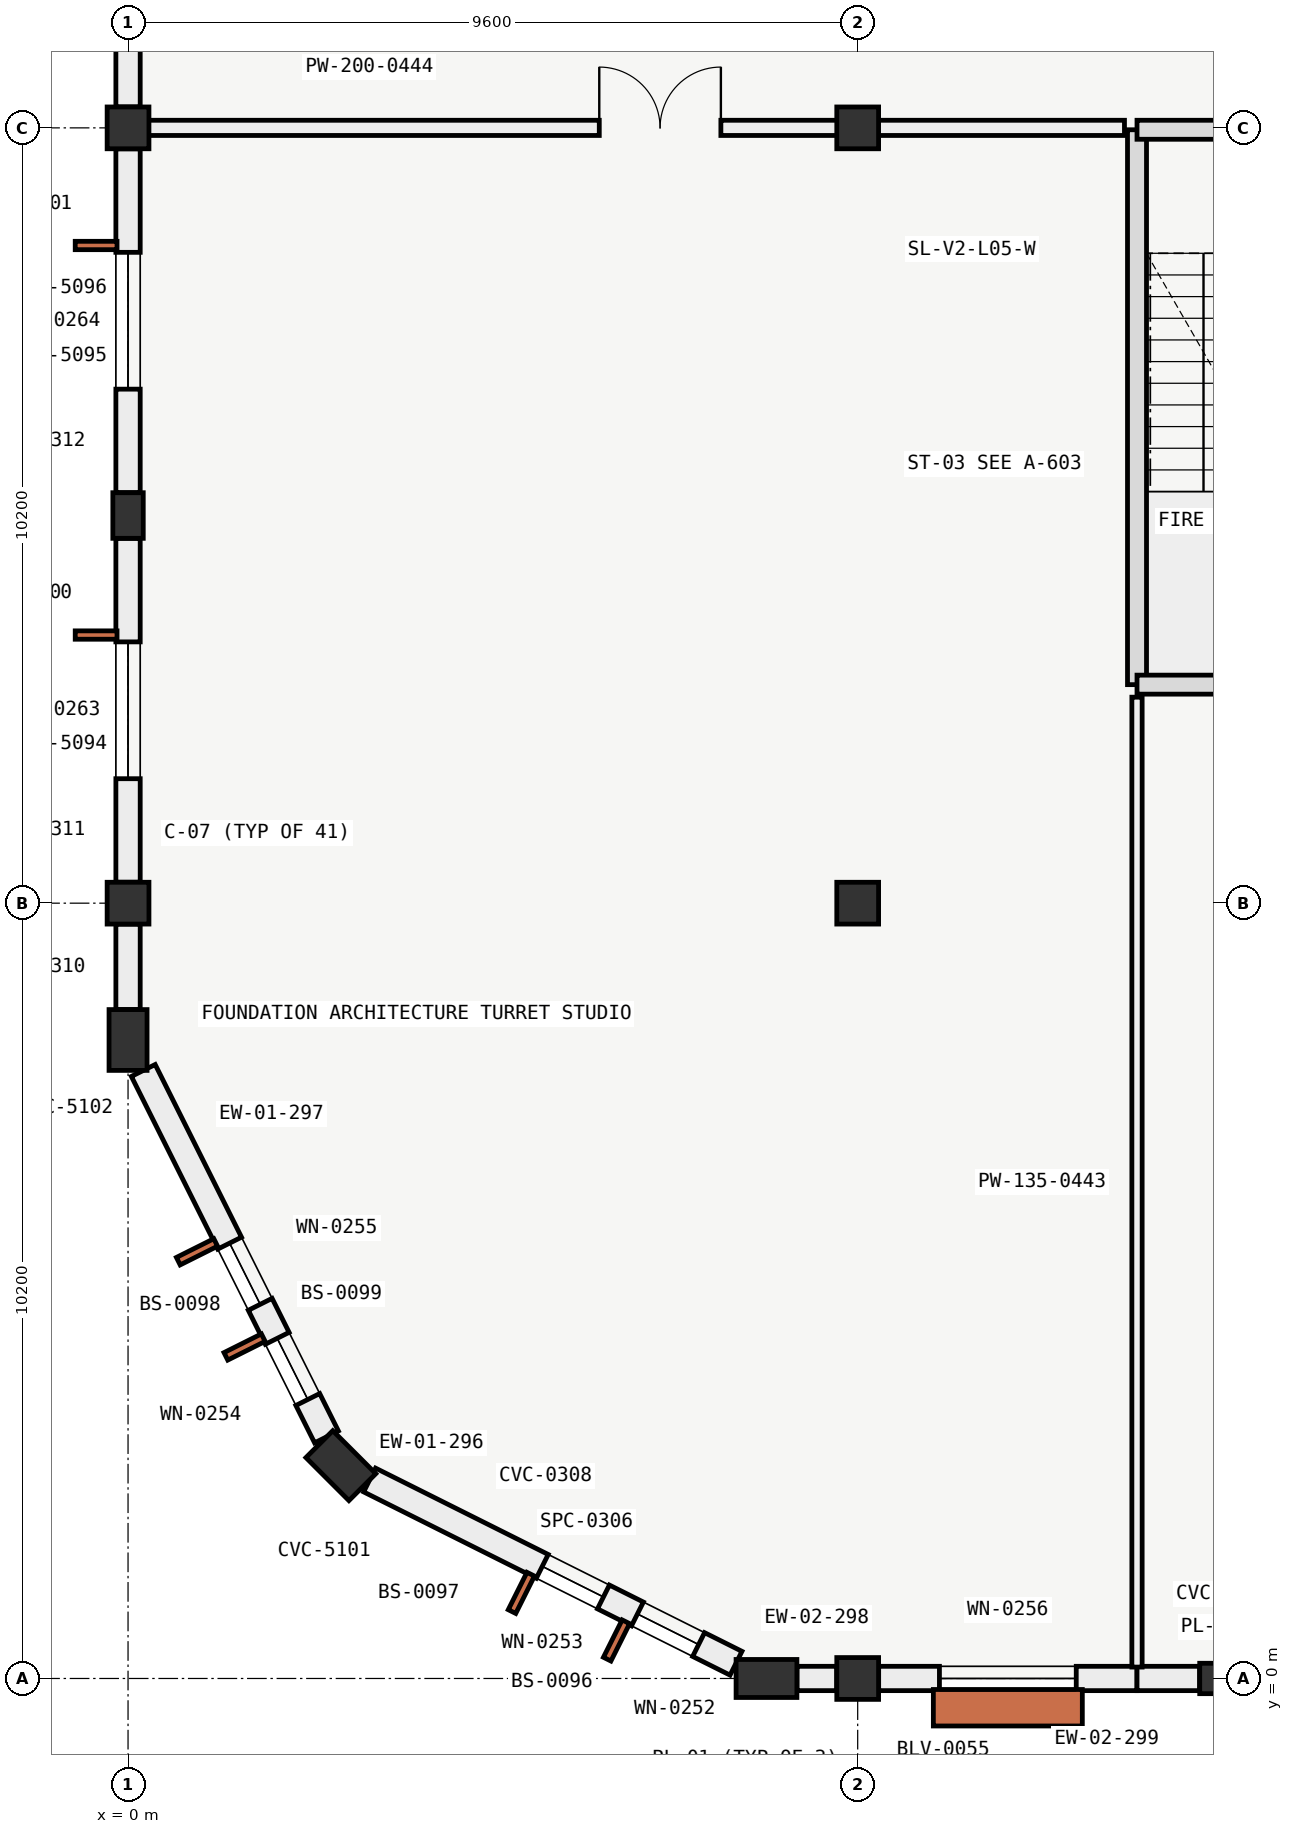
"""IFC4 building model, lengths in metres.
Left out: names, types, materials, properties, quantities, classifications, styles, units other than length and angle.
Written with IfcOpenShell. Run it as: python <this file> out.ifc"""

import sys

from ifc_helpers import new_model, si_unit, direction, frame, frame_2d, origin, origin_2d, place, context, subcontext, project, spatial, rectangle, extrude, element, fill, save


model = new_model("IFC4")
c1 = context("Model", 3, precision=1e-05, world=origin(), true_north=direction((0.0, 1.0)))
c2 = subcontext(c1, "Body", "Model", "MODEL_VIEW")
j1 = project(units=[si_unit("LENGTHUNIT", "METRE"), si_unit("PLANEANGLEUNIT", "RADIAN")], contexts=[c1])
p1 = place(None, origin())
s1 = spatial("IfcSite", under=j1, at=p1, CompositionType="ELEMENT")
p2 = place(p1, origin())
s2 = spatial("IfcBuilding", under=s1, at=p2, CompositionType="ELEMENT")
p3 = place(p2, frame((0.0, 0.0, 22.2)))
s3 = spatial("IfcBuildingStorey", under=s2, at=p3, CompositionType="ELEMENT", Elevation=22.2)
for number, where, z_axis, x_axis in (
    (1, (0.0, 10.2, 0.0), (0.0, 0.0, 1.0), (1.0, 0.0, 0.0)),
    (2, (0.0, 20.4, 0.0), (0.0, 0.0, 1.0), (1.0, 0.0, 0.0)),
    (3, (9.6, 0.0, 0.0), (0.0, 0.0, 1.0), (1.0, 0.0, 0.0)),
    (4, (9.6, 10.2, 0.0), (0.0, 0.0, 1.0), (1.0, 0.0, 0.0)),
    (5, (9.6, 20.4, 0.0), (0.0, 0.0, 1.0), (1.0, 0.0, 0.0)),
):
    element("IfcColumn", number, at=place(p3, frame(where, z_axis=z_axis, x_axis=x_axis)), inside=s3, PredefinedType="COLUMN", context=c2, shape_type="SweptSolid", body=[
        extrude(rectangle(XDim=0.55, YDim=0.55, at=origin_2d()), origin(), (0.0, 0.0, 1.0), 4.2),
    ])
for number, where, z_axis, x_axis in (
    (6, (8.4, 0.0, 0.0), (0.0, 0.0, 1.0), (0.0, 1.0, 0.0)),
    (7, (2.8, 2.8, 0.0), (0.0, 0.0, 1.0), (0.707, 0.707, 0.0)),
    (8, (0.0, 8.4, 0.0), (0.0, 0.0, 1.0), (1.0, 0.0, 0.0)),
):
    element("IfcColumn", number, at=place(p3, frame(where, z_axis=z_axis, x_axis=x_axis)), inside=s3, PredefinedType="PILASTER", context=c2, shape_type="SweptSolid", body=[
        extrude(rectangle(XDim=0.5, YDim=0.8, at=origin_2d()), origin(), (0.0, 0.0, 1.0), 4.2),
    ])
for number, where, z_axis, x_axis in (
    (9, (14.4, 0.0, 0.0), (0.0, 0.0, 1.0), (0.0, 1.0, 0.0)),
    (10, (0.0, 15.3, 0.0), (0.0, 0.0, 1.0), (1.0, 0.0, 0.0)),
):
    element("IfcColumn", number, at=place(p3, frame(where, z_axis=z_axis, x_axis=x_axis)), inside=s3, PredefinedType="PILASTER", context=c2, shape_type="SweptSolid", body=[
        extrude(rectangle(XDim=0.4, YDim=0.6, at=origin_2d()), origin(), (0.0, 0.0, 1.0), 4.2),
    ])
p4 = place(p3, frame((7.999, 0.2, 0.0), z_axis=(0.0, 0.0, 1.0), x_axis=(-0.894418132042, 0.447231712958, 0.0)))
e11 = element("IfcWall", 11, at=p4, inside=s3, PredefinedType="SOLIDWALL", context=c2, shape_type="SweptSolid", body=[
    extrude(rectangle(XDim=5.39, YDim=0.35, at=frame_2d((2.695, 0.0))), origin(), (0.0, 0.0, 1.0), 3.255),
])
p5 = place(p4, frame((0.55, 0.0, 0.7)))
e12 = element("IfcOpeningElement", 12, at=p5, cuts=e11, PredefinedType="OPENING", context=c2, shape_type="SweptSolid", body=[
    extrude(rectangle(XDim=0.9, YDim=2.2, at=frame_2d((0.45, 1.1))), frame((0.0, 0.185, 0.0), z_axis=(0.0, -1.0, 0.0), x_axis=(1.0, 0.0, 0.0)), (0.0, 0.0, 1.0), 0.37),
])
p6 = place(p4, frame((1.95, 0.0, 0.7)))
e13 = element("IfcOpeningElement", 13, at=p6, cuts=e11, PredefinedType="OPENING", context=c2, shape_type="SweptSolid", body=[
    extrude(rectangle(XDim=0.9, YDim=2.2, at=frame_2d((0.45, 1.1))), frame((0.0, 0.185, 0.0), z_axis=(0.0, -1.0, 0.0), x_axis=(1.0, 0.0, 0.0)), (0.0, 0.0, 1.0), 0.37),
])
p7 = place(p3, frame((2.611, 3.178, 0.0), z_axis=(0.0, 0.0, 1.0), x_axis=(-0.447231712958, 0.894418132042, 0.0)))
e14 = element("IfcWall", 14, at=p7, inside=s3, PredefinedType="SOLIDWALL", context=c2, shape_type="SweptSolid", body=[
    extrude(rectangle(XDim=5.39, YDim=0.35, at=frame_2d((2.695, 0.0))), origin(), (0.0, 0.0, 1.0), 3.255),
])
p8 = place(p7, frame((0.55, 0.0, 0.7)))
e15 = element("IfcOpeningElement", 15, at=p8, cuts=e14, PredefinedType="OPENING", context=c2, shape_type="SweptSolid", body=[
    extrude(rectangle(XDim=0.9, YDim=2.2, at=frame_2d((0.45, 1.1))), frame((0.0, 0.185, 0.0), z_axis=(0.0, -1.0, 0.0), x_axis=(1.0, 0.0, 0.0)), (0.0, 0.0, 1.0), 0.37),
])
p9 = place(p7, frame((1.95, 0.0, 0.7)))
e16 = element("IfcOpeningElement", 16, at=p9, cuts=e14, PredefinedType="OPENING", context=c2, shape_type="SweptSolid", body=[
    extrude(rectangle(XDim=0.9, YDim=2.2, at=frame_2d((0.45, 1.1))), frame((0.0, 0.185, 0.0), z_axis=(0.0, -1.0, 0.0), x_axis=(1.0, 0.0, 0.0)), (0.0, 0.0, 1.0), 0.37),
])
p10 = place(p3, frame((9.324, 0.0, 0.0), z_axis=(0.0, 0.0, 1.0), x_axis=(-1.0, 0.0, 0.0)))
e17 = element("IfcWall", 17, at=p10, inside=s3, PredefinedType="SOLIDWALL", context=c2, shape_type="SweptSolid", body=[
    extrude(rectangle(XDim=0.523, YDim=0.32, at=frame_2d((0.261, 0.0))), origin(), (0.0, 0.0, 1.0), 3.3),
])
p11 = place(p3, frame((13.275, 0.0, 0.0), z_axis=(0.0, 0.0, 1.0), x_axis=(-1.0, 0.0, 0.0)))
e18 = element("IfcWall", 18, at=p11, inside=s3, PredefinedType="SOLIDWALL", context=c2, shape_type="SweptSolid", body=[
    extrude(rectangle(XDim=3.399, YDim=0.32, at=frame_2d((1.699, 0.0))), origin(), (0.0, 0.0, 1.0), 3.3),
])
p12 = place(p11, frame((0.8, 0.0, 0.8)))
e19 = element("IfcOpeningElement", 19, at=p12, cuts=e18, PredefinedType="OPENING", context=c2, shape_type="SweptSolid", body=[
    extrude(rectangle(XDim=1.8, YDim=2.1, at=frame_2d((0.9, 1.05))), frame((0.0, 0.17, 0.0), z_axis=(0.0, -1.0, 0.0), x_axis=(1.0, 0.0, 0.0)), (0.0, 0.0, 1.0), 0.34),
])
p13 = place(p3, frame((14.099, 0.0, 0.0), z_axis=(0.0, 0.0, 1.0), x_axis=(-1.0, 0.0, 0.0)))
e20 = element("IfcWall", 20, at=p13, inside=s3, PredefinedType="SOLIDWALL", context=c2, shape_type="SweptSolid", body=[
    extrude(rectangle(XDim=0.824, YDim=0.32, at=frame_2d((0.412, 0.0))), origin(), (0.0, 0.0, 1.0), 3.3),
])
p14 = place(p3, frame((0.0, 8.801, 0.0), z_axis=(0.0, 0.0, 1.0), x_axis=(0.0, 1.0, 0.0)))
e21 = element("IfcWall", 21, at=p14, inside=s3, PredefinedType="SOLIDWALL", context=c2, shape_type="SweptSolid", body=[
    extrude(rectangle(XDim=1.123, YDim=0.32, at=frame_2d((0.562, 0.0))), origin(), (0.0, 0.0, 1.0), 3.3),
])
p15 = place(p3, frame((0.0, 10.476, 0.0), z_axis=(0.0, 0.0, 1.0), x_axis=(0.0, 1.0, 0.0)))
e22 = element("IfcWall", 22, at=p15, inside=s3, PredefinedType="SOLIDWALL", context=c2, shape_type="SweptSolid", body=[
    extrude(rectangle(XDim=4.523, YDim=0.32, at=frame_2d((2.261, 0.0))), origin(), (0.0, 0.0, 1.0), 3.3),
])
p16 = place(p15, frame((1.362, 0.0, 0.85)))
e23 = element("IfcOpeningElement", 23, at=p16, cuts=e22, PredefinedType="OPENING", context=c2, shape_type="SweptSolid", body=[
    extrude(rectangle(XDim=1.8, YDim=2.1, at=frame_2d((0.9, 1.05))), frame((0.0, 0.17, 0.0), z_axis=(0.0, -1.0, 0.0), x_axis=(1.0, 0.0, 0.0)), (0.0, 0.0, 1.0), 0.34),
])
p17 = place(p3, frame((0.0, 15.601, 0.0), z_axis=(0.0, 0.0, 1.0), x_axis=(0.0, 1.0, 0.0)))
e24 = element("IfcWall", 24, at=p17, inside=s3, PredefinedType="SOLIDWALL", context=c2, shape_type="SweptSolid", body=[
    extrude(rectangle(XDim=4.523, YDim=0.32, at=frame_2d((2.261, 0.0))), origin(), (0.0, 0.0, 1.0), 3.3),
])
p18 = place(p17, frame((1.362, 0.0, 0.85)))
e25 = element("IfcOpeningElement", 25, at=p18, cuts=e24, PredefinedType="OPENING", context=c2, shape_type="SweptSolid", body=[
    extrude(rectangle(XDim=1.8, YDim=2.1, at=frame_2d((0.9, 1.05))), frame((0.0, 0.17, 0.0), z_axis=(0.0, -1.0, 0.0), x_axis=(1.0, 0.0, 0.0)), (0.0, 0.0, 1.0), 0.34),
])
p19 = place(p3, frame((0.0, 20.676, 0.0), z_axis=(0.0, 0.0, 1.0), x_axis=(0.0, 1.0, 0.0)))
e26 = element("IfcWall", 26, at=p19, inside=s3, PredefinedType="SOLIDWALL", context=c2, shape_type="SweptSolid", body=[
    extrude(rectangle(XDim=3.274, YDim=0.32, at=frame_2d((1.637, 0.0))), origin(), (0.0, 0.0, 1.0), 3.3),
])
p20 = place(p19, frame((1.037, 0.0, 0.75)))
e27 = element("IfcOpeningElement", 27, at=p20, cuts=e26, PredefinedType="OPENING", context=c2, shape_type="SweptSolid", body=[
    extrude(rectangle(XDim=1.2, YDim=2.4, at=frame_2d((0.6, 1.2))), frame((0.0, 0.17, 0.0), z_axis=(0.0, -1.0, 0.0), x_axis=(1.0, 0.0, 0.0)), (0.0, 0.0, 1.0), 0.34),
])
p21 = place(p3, frame((13.275, 20.375, 0.0), z_axis=(0.0, 0.0, 1.0), x_axis=(0.0, -1.0, 0.0)))
e28 = element("IfcWall", 28, at=p21, inside=s3, PredefinedType="SOLIDWALL", context=c2, shape_type="SweptSolid", body=[
    extrude(rectangle(XDim=7.3, YDim=0.25, at=frame_2d((3.65, 0.0))), origin(), (0.0, 0.0, 1.0), 3.975),
])
p22 = place(p3, frame((13.275, 13.075, 0.0), z_axis=(0.0, 0.0, 1.0), x_axis=(1.0, 0.0, 0.0)))
e29 = element("IfcWall", 29, at=p22, inside=s3, PredefinedType="SOLIDWALL", context=c2, shape_type="SweptSolid", body=[
    extrude(rectangle(XDim=3.45, YDim=0.25, at=frame_2d((1.725, 0.0))), origin(), (0.0, 0.0, 1.0), 3.975),
])
p23 = place(p3, frame((16.725, 20.375, 0.0), z_axis=(0.0, 0.0, 1.0), x_axis=(-1.0, 0.0, 0.0)))
e30 = element("IfcWall", 30, at=p23, inside=s3, PredefinedType="SOLIDWALL", context=c2, shape_type="SweptSolid", body=[
    extrude(rectangle(XDim=3.45, YDim=0.25, at=frame_2d((1.725, 0.0))), origin(), (0.0, 0.0, 1.0), 3.975),
])
p24 = place(p23, frame((1.175, 0.0, 0.0)))
e31 = element("IfcOpeningElement", 31, at=p24, cuts=e30, PredefinedType="OPENING", context=c2, shape_type="SweptSolid", body=[
    extrude(rectangle(XDim=1.1, YDim=2.2, at=frame_2d((0.55, 1.1))), frame((0.0, 0.135, 0.0), z_axis=(0.0, -1.0, 0.0), x_axis=(1.0, 0.0, 0.0)), (0.0, 0.0, 1.0), 0.27),
])
p25 = place(p3, frame((13.275, 0.15, 0.0), z_axis=(0.0, 0.0, 1.0), x_axis=(0.0, 1.0, 0.0)))
e32 = element("IfcWall", 32, at=p25, inside=s3, PredefinedType="PARTITIONING", context=c2, shape_type="SweptSolid", body=[
    extrude(rectangle(XDim=12.76, YDim=0.135, at=frame_2d((6.38, 0.0))), origin(), (0.0, 0.0, 1.0), 3.405),
])
p26 = place(p3, frame((0.15, 20.4, 0.0), z_axis=(0.0, 0.0, 1.0), x_axis=(1.0, 0.0, 0.0)))
e33 = element("IfcWall", 33, at=p26, inside=s3, PredefinedType="PARTITIONING", context=c2, shape_type="SweptSolid", body=[
    extrude(rectangle(XDim=12.96, YDim=0.2, at=frame_2d((6.48, 0.0))), origin(), (0.0, 0.0, 1.0), 3.305),
])
p27 = place(p26, frame((6.05, 0.0, 0.0)))
e34 = element("IfcOpeningElement", 34, at=p27, cuts=e33, PredefinedType="OPENING", context=c2, shape_type="SweptSolid", body=[
    extrude(rectangle(XDim=1.6, YDim=2.25, at=frame_2d((0.8, 1.125))), frame((0.0, 0.11, 0.0), z_axis=(0.0, -1.0, 0.0), x_axis=(1.0, 0.0, 0.0)), (0.0, 0.0, 1.0), 0.22),
])
p28 = place(p5, origin())
e35 = element("IfcWindow", 35, at=p28, inside=s3, PartitioningType="SINGLE_PANEL", PredefinedType="WINDOW", context=c2, shape_type="SweptSolid", body=[
    extrude(rectangle(XDim=0.9, YDim=2.2, at=frame_2d((0.45, 1.1))), frame((0.0, 0.03, 0.0), z_axis=(0.0, -1.0, 0.0), x_axis=(1.0, 0.0, 0.0)), (0.0, 0.0, 1.0), 0.06),
])
fill(e12, e35)
p29 = place(p6, origin())
e36 = element("IfcWindow", 36, at=p29, inside=s3, PartitioningType="SINGLE_PANEL", PredefinedType="WINDOW", context=c2, shape_type="SweptSolid", body=[
    extrude(rectangle(XDim=0.9, YDim=2.2, at=frame_2d((0.45, 1.1))), frame((0.0, 0.03, 0.0), z_axis=(0.0, -1.0, 0.0), x_axis=(1.0, 0.0, 0.0)), (0.0, 0.0, 1.0), 0.06),
])
fill(e13, e36)
p30 = place(p8, origin())
e37 = element("IfcWindow", 37, at=p30, inside=s3, PartitioningType="SINGLE_PANEL", PredefinedType="WINDOW", context=c2, shape_type="SweptSolid", body=[
    extrude(rectangle(XDim=0.9, YDim=2.2, at=frame_2d((0.45, 1.1))), frame((0.0, 0.03, 0.0), z_axis=(0.0, -1.0, 0.0), x_axis=(1.0, 0.0, 0.0)), (0.0, 0.0, 1.0), 0.06),
])
fill(e15, e37)
p31 = place(p9, origin())
e38 = element("IfcWindow", 38, at=p31, inside=s3, PartitioningType="SINGLE_PANEL", PredefinedType="WINDOW", context=c2, shape_type="SweptSolid", body=[
    extrude(rectangle(XDim=0.9, YDim=2.2, at=frame_2d((0.45, 1.1))), frame((0.0, 0.03, 0.0), z_axis=(0.0, -1.0, 0.0), x_axis=(1.0, 0.0, 0.0)), (0.0, 0.0, 1.0), 0.06),
])
fill(e16, e38)
p32 = place(p12, origin())
e39 = element("IfcWindow", 39, at=p32, inside=s3, PartitioningType="SINGLE_PANEL", PredefinedType="WINDOW", context=c2, shape_type="SweptSolid", body=[
    extrude(rectangle(XDim=1.8, YDim=2.1, at=frame_2d((0.9, 1.05))), frame((0.0, 0.03, 0.0), z_axis=(0.0, -1.0, 0.0), x_axis=(1.0, 0.0, 0.0)), (0.0, 0.0, 1.0), 0.06),
])
fill(e19, e39)
p33 = place(p16, origin())
e40 = element("IfcWindow", 40, at=p33, inside=s3, PartitioningType="SINGLE_PANEL", PredefinedType="WINDOW", context=c2, shape_type="SweptSolid", body=[
    extrude(rectangle(XDim=1.8, YDim=2.1, at=frame_2d((0.9, 1.05))), frame((0.0, 0.03, 0.0), z_axis=(0.0, -1.0, 0.0), x_axis=(1.0, 0.0, 0.0)), (0.0, 0.0, 1.0), 0.06),
])
fill(e23, e40)
p34 = place(p18, origin())
e41 = element("IfcWindow", 41, at=p34, inside=s3, PartitioningType="SINGLE_PANEL", PredefinedType="WINDOW", context=c2, shape_type="SweptSolid", body=[
    extrude(rectangle(XDim=1.8, YDim=2.1, at=frame_2d((0.9, 1.05))), frame((0.0, 0.03, 0.0), z_axis=(0.0, -1.0, 0.0), x_axis=(1.0, 0.0, 0.0)), (0.0, 0.0, 1.0), 0.06),
])
fill(e25, e41)
p35 = place(p27, origin())
e42 = element("IfcDoor", 42, at=p35, inside=s3, OperationType="DOUBLE_DOOR_SINGLE_SWING", PredefinedType="DOOR", context=c2, shape_type="SweptSolid", body=[
    extrude(rectangle(XDim=1.6, YDim=2.25, at=frame_2d((0.8, 1.125))), frame((0.0, 0.025, 0.0), z_axis=(0.0, -1.0, 0.0), x_axis=(1.0, 0.0, 0.0)), (0.0, 0.0, 1.0), 0.05),
])
fill(e34, e42)
save(model, sys.argv[1])
